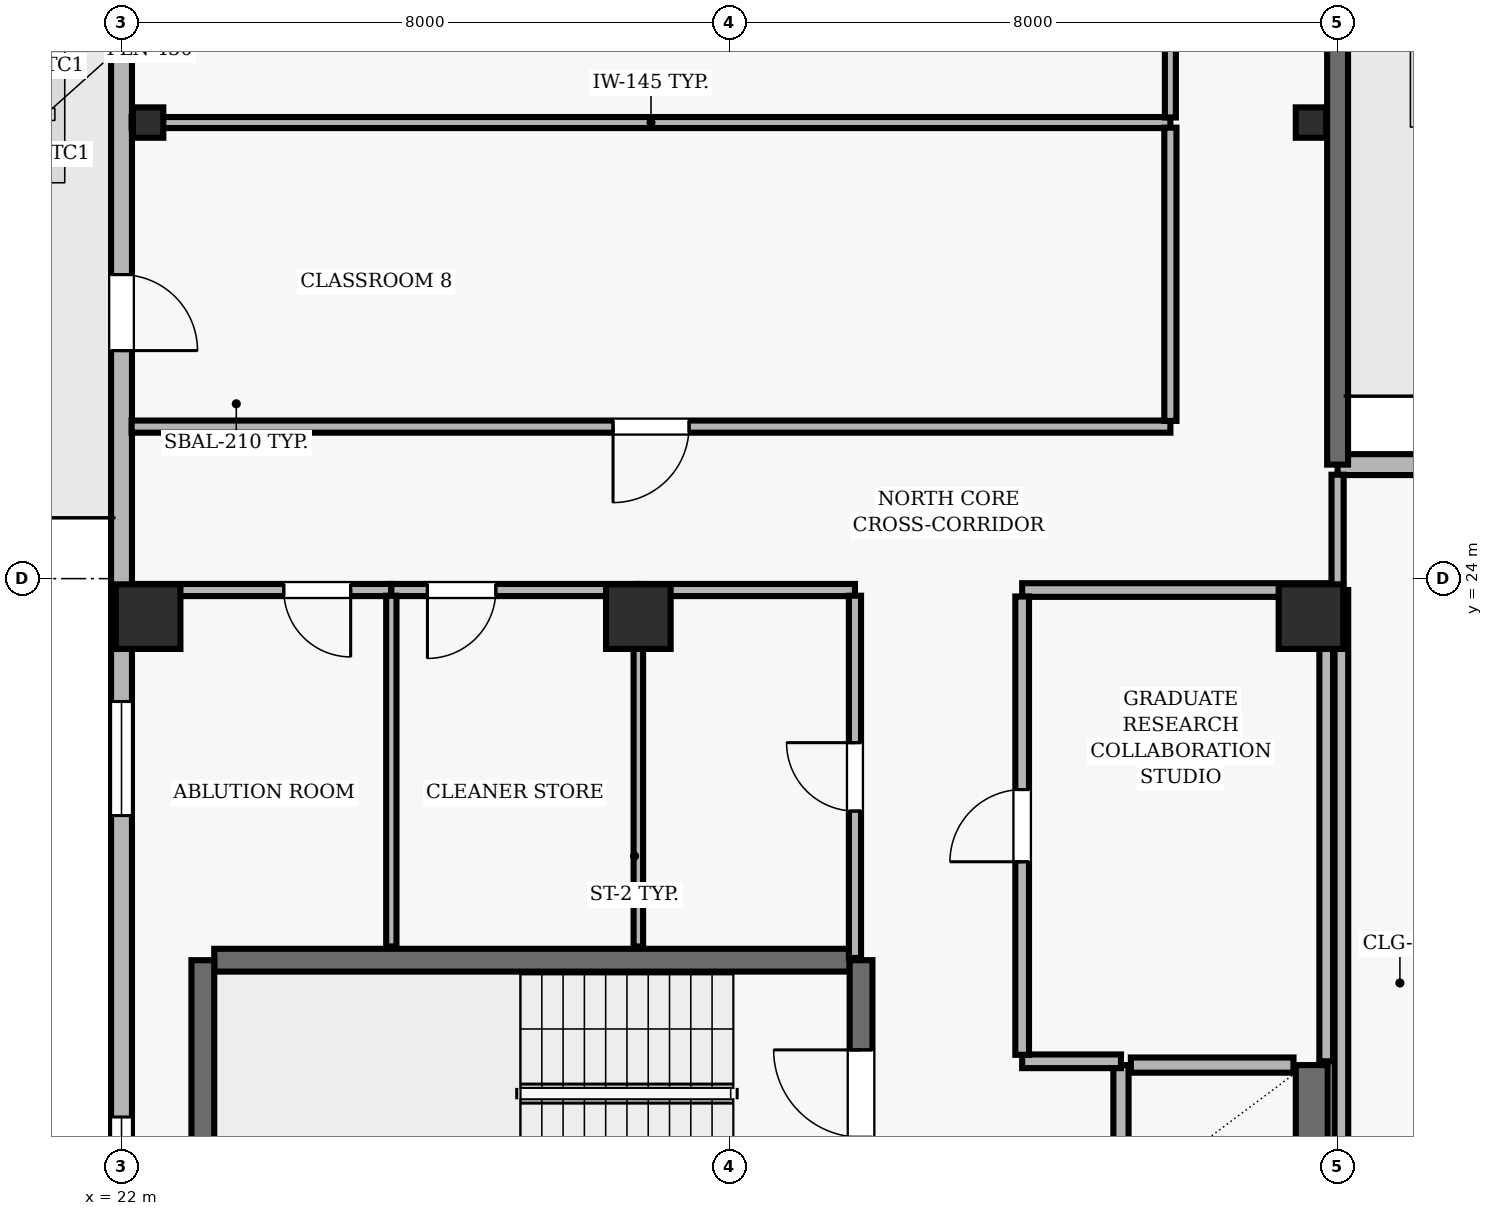
"""IFC4 building model, lengths in metres.
Left out: names, types, materials, properties, quantities, classifications, styles, units other than length and angle.
Written with IfcOpenShell. Run it as: python <this file> out.ifc"""

import sys

from ifc_helpers import new_model, si_unit, direction, frame, frame_2d, origin, origin_2d, place, context, subcontext, project, spatial, rectangle, hollow_rectangle, extrude, element, fill, save


model = new_model("IFC4")
c1 = context("Model", 3, precision=1e-05, world=origin(), true_north=direction((0.0, 1.0)))
c2 = subcontext(c1, "Body", "Model", "MODEL_VIEW")
j1 = project(units=[si_unit("LENGTHUNIT", "METRE"), si_unit("PLANEANGLEUNIT", "RADIAN")], contexts=[c1])
p1 = place(None, origin())
s1 = spatial("IfcSite", under=j1, at=p1, CompositionType="ELEMENT")
p2 = place(p1, origin())
s2 = spatial("IfcBuilding", under=s1, at=p2, CompositionType="ELEMENT")
p3 = place(p2, frame((0.0, 0.0, 252.1)))
s3 = spatial("IfcBuildingStorey", under=s2, at=p3, CompositionType="ELEMENT", Elevation=252.1)
for number, where, z_axis, x_axis in (
    (1, (22.35, 23.5, 0.0), (0.0, 0.0, 1.0), (1.0, 0.0, 0.0)),
    (2, (28.8, 23.5, 0.0), (0.0, 0.0, 1.0), (1.0, 0.0, 0.0)),
    (3, (37.65, 23.5, 0.0), (0.0, 0.0, 1.0), (1.0, 0.0, 0.0)),
):
    element("IfcColumn", number, at=place(p3, frame(where, z_axis=z_axis, x_axis=x_axis)), inside=s3, PredefinedType="COLUMN", context=c2, shape_type="SweptSolid", body=[
        extrude(rectangle(XDim=0.85, YDim=0.85, at=origin_2d()), origin(), (0.0, 0.0, 1.0), 3.9),
    ])
for number, where, z_axis, x_axis in (
    (4, (22.35, 30.0, 0.0), (0.0, 0.0, 1.0), (1.0, 0.0, 0.0)),
    (5, (37.65, 30.0, 0.0), (0.0, 0.0, 1.0), (1.0, 0.0, 0.0)),
):
    element("IfcColumn", number, at=place(p3, frame(where, z_axis=z_axis, x_axis=x_axis)), inside=s3, PredefinedType="COLUMN", context=c2, shape_type="SweptSolid", body=[
        extrude(hollow_rectangle(XDim=0.4, YDim=0.4, WallThickness=0.02, at=origin_2d()), origin(), (0.0, 0.0, 1.0), 3.9),
    ])
p4 = place(p3, frame((43.64, 25.5, 0.0), z_axis=(0.0, 0.0, 1.0), x_axis=(-1.0, 0.0, 0.0)))
e6 = element("IfcWall", 6, at=p4, inside=s3, PredefinedType="SOLIDWALL", context=c2, shape_type="SweptSolid", body=[
    extrude(rectangle(XDim=5.64, YDim=0.275, at=frame_2d((2.82, 0.0))), origin(), (0.0, 0.0, 1.0), 3.69),
])
p5 = place(p4, frame((1.42, 0.0, 0.9)))
e7 = element("IfcOpeningElement", 7, at=p5, cuts=e6, PredefinedType="OPENING", context=c2, shape_type="SweptSolid", body=[
    extrude(rectangle(XDim=2.8, YDim=1.8, at=frame_2d((1.4, 0.9))), frame((0.0, 0.147, 0.0), z_axis=(0.0, -1.0, 0.0), x_axis=(1.0, 0.0, 0.0)), (0.0, 0.0, 1.0), 0.295),
])
p6 = place(p3, frame((38.0, 25.5, 0.0), z_axis=(0.0, 0.0, 1.0), x_axis=(0.0, 1.0, 0.0)))
e8 = element("IfcWall", 8, at=p6, inside=s3, PredefinedType="SOLIDWALL", context=c2, shape_type="SweptSolid", body=[
    extrude(rectangle(XDim=9.8, YDim=0.275, at=frame_2d((4.9, 0.0))), origin(), (0.0, 0.0, 1.0), 3.69),
])
p7 = place(p6, frame((6.7, 0.0, 0.0)))
e9 = element("IfcOpeningElement", 9, at=p7, cuts=e8, PredefinedType="OPENING", context=c2, shape_type="SweptSolid", body=[
    extrude(rectangle(XDim=1.0, YDim=2.2, at=frame_2d((0.5, 1.1))), frame((0.0, 0.147, 0.0), z_axis=(0.0, -1.0, 0.0), x_axis=(1.0, 0.0, 0.0)), (0.0, 0.0, 1.0), 0.295),
])
p8 = place(p3, frame((22.0, 35.3, 0.0), z_axis=(0.0, 0.0, 1.0), x_axis=(0.0, -1.0, 0.0)))
e10 = element("IfcWall", 10, at=p8, inside=s3, PredefinedType="SOLIDWALL", context=c2, shape_type="SweptSolid", body=[
    extrude(rectangle(XDim=32.8, YDim=0.275, at=frame_2d((16.4, 0.0))), origin(), (0.0, 0.0, 1.0), 3.69),
])
p9 = place(p8, frame((7.3, 0.0, 0.0)))
e11 = element("IfcOpeningElement", 11, at=p9, cuts=e10, PredefinedType="OPENING", context=c2, shape_type="SweptSolid", body=[
    extrude(rectangle(XDim=1.0, YDim=2.2, at=frame_2d((0.5, 1.1))), frame((0.0, 0.147, 0.0), z_axis=(0.0, -1.0, 0.0), x_axis=(1.0, 0.0, 0.0)), (0.0, 0.0, 1.0), 0.295),
])
p10 = place(p8, frame((1.983, 0.0, 0.9)))
e12 = element("IfcOpeningElement", 12, at=p10, cuts=e10, PredefinedType="OPENING", context=c2, shape_type="SweptSolid", body=[
    extrude(rectangle(XDim=1.5, YDim=1.6, at=frame_2d((0.75, 0.8))), frame((0.0, 0.147, 0.0), z_axis=(0.0, -1.0, 0.0), x_axis=(1.0, 0.0, 0.0)), (0.0, 0.0, 1.0), 0.295),
])
p11 = place(p8, frame((12.917, 0.0, 0.9)))
e13 = element("IfcOpeningElement", 13, at=p11, cuts=e10, PredefinedType="OPENING", context=c2, shape_type="SweptSolid", body=[
    extrude(rectangle(XDim=1.5, YDim=1.6, at=frame_2d((0.75, 0.8))), frame((0.0, 0.147, 0.0), z_axis=(0.0, -1.0, 0.0), x_axis=(1.0, 0.0, 0.0)), (0.0, 0.0, 1.0), 0.295),
])
p12 = place(p8, frame((18.383, 0.0, 0.9)))
e14 = element("IfcOpeningElement", 14, at=p12, cuts=e10, PredefinedType="OPENING", context=c2, shape_type="SweptSolid", body=[
    extrude(rectangle(XDim=1.5, YDim=1.6, at=frame_2d((0.75, 0.8))), frame((0.0, 0.147, 0.0), z_axis=(0.0, -1.0, 0.0), x_axis=(1.0, 0.0, 0.0)), (0.0, 0.0, 1.0), 0.295),
])
p13 = place(p8, frame((23.85, 0.0, 0.9)))
e15 = element("IfcOpeningElement", 15, at=p13, cuts=e10, PredefinedType="OPENING", context=c2, shape_type="SweptSolid", body=[
    extrude(rectangle(XDim=1.5, YDim=1.6, at=frame_2d((0.75, 0.8))), frame((0.0, 0.147, 0.0), z_axis=(0.0, -1.0, 0.0), x_axis=(1.0, 0.0, 0.0)), (0.0, 0.0, 1.0), 0.295),
])
p14 = place(p3, frame((31.58, 18.98, 0.0), z_axis=(0.0, 0.0, 1.0), x_axis=(-1.0, 0.0, 0.0)))
e16 = element("IfcWall", 16, at=p14, inside=s3, PredefinedType="SHEAR", context=c2, shape_type="SweptSolid", body=[
    extrude(rectangle(XDim=8.36, YDim=0.3, at=frame_2d((4.18, 0.0))), origin(), (0.0, 0.0, 1.0), 3.69),
])
p15 = place(p3, frame((23.07, 18.98, 0.0), z_axis=(0.0, 0.0, 1.0), x_axis=(0.0, -1.0, 0.0)))
e17 = element("IfcWall", 17, at=p15, inside=s3, PredefinedType="SHEAR", context=c2, shape_type="SweptSolid", body=[
    extrude(rectangle(XDim=3.51, YDim=0.3, at=frame_2d((1.755, 0.0))), origin(), (0.0, 0.0, 1.0), 3.69),
])
p16 = place(p3, frame((31.73, 15.47, 0.0), z_axis=(0.0, 0.0, 1.0), x_axis=(0.0, 1.0, 0.0)))
e18 = element("IfcWall", 18, at=p16, inside=s3, PredefinedType="SHEAR", context=c2, shape_type="SweptSolid", body=[
    extrude(rectangle(XDim=3.51, YDim=0.3, at=frame_2d((1.755, 0.0))), origin(), (0.0, 0.0, 1.0), 3.69),
])
p17 = place(p16, frame((1.18, 0.0, 0.0)))
e19 = element("IfcOpeningElement", 19, at=p17, cuts=e18, PredefinedType="OPENING", context=c2, shape_type="SweptSolid", body=[
    extrude(rectangle(XDim=1.15, YDim=2.15, at=frame_2d((0.575, 1.075))), frame((0.0, 0.16, 0.0), z_axis=(0.0, -1.0, 0.0), x_axis=(1.0, 0.0, 0.0)), (0.0, 0.0, 1.0), 0.32),
])
p18 = place(p3, frame((35.15, 17.6, 0.0), z_axis=(0.0, 0.0, 1.0), x_axis=(0.0, -1.0, 0.0)))
e20 = element("IfcWall", 20, at=p18, inside=s3, PredefinedType="SOLIDWALL", context=c2, shape_type="SweptSolid", body=[
    extrude(rectangle(XDim=1.85, YDim=0.2, at=frame_2d((0.925, 0.0))), origin(), (0.0, 0.0, 1.0), 3.69),
])
p19 = place(p3, frame((37.66, 15.75, 0.0), z_axis=(0.0, 0.0, 1.0), x_axis=(0.0, 1.0, 0.0)))
e21 = element("IfcWall", 21, at=p19, inside=s3, PredefinedType="SHEAR", context=c2, shape_type="SweptSolid", body=[
    extrude(rectangle(XDim=1.85, YDim=0.42, at=frame_2d((0.925, 0.0))), origin(), (0.0, 0.0, 1.0), 3.69),
])
p20 = place(p3, frame((37.42, 17.6, 0.0), z_axis=(0.0, 0.0, 1.0), x_axis=(-1.0, 0.0, 0.0)))
e22 = element("IfcWall", 22, at=p20, inside=s3, PredefinedType="SOLIDWALL", context=c2, shape_type="SweptSolid", body=[
    extrude(rectangle(XDim=2.14, YDim=0.2, at=frame_2d((1.07, 0.0))), origin(), (0.0, 0.0, 1.0), 3.69),
])
p21 = place(p3, frame((25.55, 23.85, 0.0), z_axis=(0.0, 0.0, 1.0), x_axis=(-1.0, 0.0, 0.0)))
e23 = element("IfcWall", 23, at=p21, inside=s3, PredefinedType="PARTITIONING", context=c2, shape_type="SweptSolid", body=[
    extrude(rectangle(XDim=3.35, YDim=0.16, at=frame_2d((1.675, 0.0))), origin(), (0.0, 0.0, 1.0), 3.227),
])
p22 = place(p21, frame((0.535, 0.0, 0.0)))
e24 = element("IfcOpeningElement", 24, at=p22, cuts=e23, PredefinedType="OPENING", context=c2, shape_type="SweptSolid", body=[
    extrude(rectangle(XDim=0.88, YDim=2.1, at=frame_2d((0.44, 1.05))), frame((0.0, 0.09, 0.0), z_axis=(0.0, -1.0, 0.0), x_axis=(1.0, 0.0, 0.0)), (0.0, 0.0, 1.0), 0.18),
])
p23 = place(p3, frame((28.8, 23.85, 0.0), z_axis=(0.0, 0.0, 1.0), x_axis=(-1.0, 0.0, 0.0)))
e25 = element("IfcWall", 25, at=p23, inside=s3, PredefinedType="PARTITIONING", context=c2, shape_type="SweptSolid", body=[
    extrude(rectangle(XDim=3.25, YDim=0.16, at=frame_2d((1.625, 0.0))), origin(), (0.0, 0.0, 1.0), 3.227),
])
p24 = place(p23, frame((1.875, 0.0, 0.0)))
e26 = element("IfcOpeningElement", 26, at=p24, cuts=e25, PredefinedType="OPENING", context=c2, shape_type="SweptSolid", body=[
    extrude(rectangle(XDim=0.9, YDim=2.1, at=frame_2d((0.45, 1.05))), frame((0.0, 0.09, 0.0), z_axis=(0.0, -1.0, 0.0), x_axis=(1.0, 0.0, 0.0)), (0.0, 0.0, 1.0), 0.18),
])
p25 = place(p3, frame((31.65, 23.85, 0.0), z_axis=(0.0, 0.0, 1.0), x_axis=(-1.0, 0.0, 0.0)))
e27 = element("IfcWall", 27, at=p25, inside=s3, PredefinedType="PARTITIONING", context=c2, shape_type="SweptSolid", body=[
    extrude(rectangle(XDim=2.85, YDim=0.16, at=frame_2d((1.425, 0.0))), origin(), (0.0, 0.0, 1.0), 3.227),
])
p26 = place(p3, frame((33.85, 17.65, 0.0), z_axis=(0.0, 0.0, 1.0), x_axis=(1.0, 0.0, 0.0)))
e28 = element("IfcWall", 28, at=p26, inside=s3, PredefinedType="PARTITIONING", context=c2, shape_type="SweptSolid", body=[
    extrude(rectangle(XDim=1.3, YDim=0.18, at=frame_2d((0.65, 0.0))), origin(), (0.0, 0.0, 1.0), 3.69),
])
p27 = place(p3, frame((35.8, 26.0, 0.0), z_axis=(0.0, 0.0, 1.0), x_axis=(-1.0, 0.0, 0.0)))
e29 = element("IfcWall", 29, at=p27, inside=s3, PredefinedType="PARTITIONING", context=c2, shape_type="SweptSolid", body=[
    extrude(rectangle(XDim=13.667, YDim=0.16, at=frame_2d((6.833, 0.0))), origin(), (0.0, 0.0, 1.0), 3.69),
])
p28 = place(p27, frame((6.333, 0.0, 0.0)))
e30 = element("IfcOpeningElement", 30, at=p28, cuts=e29, PredefinedType="OPENING", context=c2, shape_type="SweptSolid", body=[
    extrude(rectangle(XDim=1.0, YDim=2.1, at=frame_2d((0.5, 1.05))), frame((0.0, 0.09, 0.0), z_axis=(0.0, -1.0, 0.0), x_axis=(1.0, 0.0, 0.0)), (0.0, 0.0, 1.0), 0.18),
])
p29 = place(p3, frame((35.8, 30.0, 0.0), z_axis=(0.0, 0.0, 1.0), x_axis=(-1.0, 0.0, 0.0)))
e31 = element("IfcWall", 31, at=p29, inside=s3, PredefinedType="PARTITIONING", context=c2, shape_type="SweptSolid", body=[
    extrude(rectangle(XDim=13.667, YDim=0.145, at=frame_2d((6.833, 0.0))), origin(), (0.0, 0.0, 1.0), 3.227),
])
p30 = place(p3, frame((37.85, 23.85, 0.0), z_axis=(0.0, 0.0, 1.0), x_axis=(-1.0, 0.0, 0.0)))
e32 = element("IfcWall", 32, at=p30, inside=s3, PredefinedType="PARTITIONING", context=c2, shape_type="SweptSolid", body=[
    extrude(rectangle(XDim=4.0, YDim=0.18, at=frame_2d((2.0, 0.0))), origin(), (0.0, 0.0, 1.0), 3.227),
])
p31 = place(p3, frame((25.55, 19.16, 0.0), z_axis=(0.0, 0.0, 1.0), x_axis=(0.0, 1.0, 0.0)))
e33 = element("IfcWall", 33, at=p31, inside=s3, PredefinedType="PARTITIONING", context=c2, shape_type="SweptSolid", body=[
    extrude(rectangle(XDim=4.615, YDim=0.135, at=frame_2d((2.308, 0.0))), origin(), (0.0, 0.0, 1.0), 3.69),
])
p32 = place(p3, frame((28.8, 23.775, 0.0), z_axis=(0.0, 0.0, 1.0), x_axis=(0.0, -1.0, 0.0)))
e34 = element("IfcWall", 34, at=p32, inside=s3, PredefinedType="PARTITIONING", context=c2, shape_type="SweptSolid", body=[
    extrude(rectangle(XDim=4.615, YDim=0.125, at=frame_2d((2.308, 0.0))), origin(), (0.0, 0.0, 1.0), 3.69),
])
p33 = place(p3, frame((31.65, 19.01, 0.0), z_axis=(0.0, 0.0, 1.0), x_axis=(0.0, 1.0, 0.0)))
e35 = element("IfcWall", 35, at=p33, inside=s3, PredefinedType="PARTITIONING", context=c2, shape_type="SweptSolid", body=[
    extrude(rectangle(XDim=4.765, YDim=0.16, at=frame_2d((2.382, 0.0))), origin(), (0.0, 0.0, 1.0), 3.69),
])
p34 = place(p33, frame((1.932, 0.0, 0.0)))
e36 = element("IfcOpeningElement", 36, at=p34, cuts=e35, PredefinedType="OPENING", context=c2, shape_type="SweptSolid", body=[
    extrude(rectangle(XDim=0.9, YDim=2.1, at=frame_2d((0.45, 1.05))), frame((0.0, 0.09, 0.0), z_axis=(0.0, -1.0, 0.0), x_axis=(1.0, 0.0, 0.0)), (0.0, 0.0, 1.0), 0.18),
])
p35 = place(p3, frame((33.85, 17.735, 0.0), z_axis=(0.0, 0.0, 1.0), x_axis=(0.0, 1.0, 0.0)))
e37 = element("IfcWall", 37, at=p35, inside=s3, PredefinedType="PARTITIONING", context=c2, shape_type="SweptSolid", body=[
    extrude(rectangle(XDim=6.03, YDim=0.18, at=frame_2d((3.015, 0.0))), origin(), (0.0, 0.0, 1.0), 3.69),
])
p36 = place(p35, frame((2.54, 0.0, 0.0)))
e38 = element("IfcOpeningElement", 38, at=p36, cuts=e37, PredefinedType="OPENING", context=c2, shape_type="SweptSolid", body=[
    extrude(rectangle(XDim=0.95, YDim=2.1, at=frame_2d((0.475, 1.05))), frame((0.0, 0.1, 0.0), z_axis=(0.0, -1.0, 0.0), x_axis=(1.0, 0.0, 0.0)), (0.0, 0.0, 1.0), 0.2),
])
p37 = place(p3, frame((35.8, 29.933, 0.0), z_axis=(0.0, 0.0, 1.0), x_axis=(0.0, -1.0, 0.0)))
e39 = element("IfcWall", 39, at=p37, inside=s3, PredefinedType="PARTITIONING", context=c2, shape_type="SweptSolid", body=[
    extrude(rectangle(XDim=3.858, YDim=0.16, at=frame_2d((1.929, 0.0))), origin(), (0.0, 0.0, 1.0), 3.69),
])
p38 = place(p3, frame((35.8, 33.935, 0.0), z_axis=(0.0, 0.0, 1.0), x_axis=(0.0, -1.0, 0.0)))
e40 = element("IfcWall", 40, at=p38, inside=s3, PredefinedType="PARTITIONING", context=c2, shape_type="SweptSolid", body=[
    extrude(rectangle(XDim=3.868, YDim=0.145, at=frame_2d((1.934, 0.0))), origin(), (0.0, 0.0, 1.0), 3.69),
])
p39 = place(p38, frame((1.384, 0.0, 0.0)))
e41 = element("IfcOpeningElement", 41, at=p39, cuts=e40, PredefinedType="OPENING", context=c2, shape_type="SweptSolid", body=[
    extrude(rectangle(XDim=1.1, YDim=2.15, at=frame_2d((0.55, 1.075))), frame((0.0, 0.083, 0.0), z_axis=(0.0, -1.0, 0.0), x_axis=(1.0, 0.0, 0.0)), (0.0, 0.0, 1.0), 0.165),
])
p40 = place(p3, frame((37.85, 17.65, 0.0), z_axis=(0.0, 0.0, 1.0), x_axis=(0.0, 1.0, 0.0)))
e42 = element("IfcWall", 42, at=p40, inside=s3, PredefinedType="PARTITIONING", context=c2, shape_type="SweptSolid", body=[
    extrude(rectangle(XDim=6.115, YDim=0.18, at=frame_2d((3.058, 0.0))), origin(), (0.0, 0.0, 1.0), 3.227),
])
p41 = place(p3, frame((38.0, 23.85, 0.0), z_axis=(0.0, 0.0, 1.0), x_axis=(0.0, 1.0, 0.0)))
e43 = element("IfcWall", 43, at=p41, inside=s3, PredefinedType="PARTITIONING", context=c2, shape_type="SweptSolid", body=[
    extrude(rectangle(XDim=1.517, YDim=0.16, at=frame_2d((0.758, 0.0))), origin(), (0.0, 0.0, 1.0), 3.227),
])
p42 = place(p3, frame((38.05, 23.85, 0.0), z_axis=(0.0, 0.0, 1.0), x_axis=(0.0, -1.0, 0.0)))
e44 = element("IfcWall", 44, at=p42, inside=s3, PredefinedType="PARTITIONING", context=c2, shape_type="SweptSolid", body=[
    extrude(rectangle(XDim=7.775, YDim=0.18, at=frame_2d((3.888, 0.0))), origin(), (0.0, 0.0, 1.0), 3.227),
])
p43 = place(p9, origin())
e45 = element("IfcDoor", 45, at=p43, inside=s3, OperationType="SINGLE_SWING_RIGHT", PredefinedType="DOOR", context=c2, shape_type="SweptSolid", body=[
    extrude(rectangle(XDim=1.0, YDim=2.2, at=frame_2d((0.5, 1.1))), frame((0.0, 0.025, 0.0), z_axis=(0.0, -1.0, 0.0), x_axis=(1.0, 0.0, 0.0)), (0.0, 0.0, 1.0), 0.05),
])
fill(e11, e45)
p44 = place(p11, origin())
e46 = element("IfcWindow", 46, at=p44, inside=s3, PartitioningType="SINGLE_PANEL", PredefinedType="WINDOW", context=c2, shape_type="SweptSolid", body=[
    extrude(rectangle(XDim=1.5, YDim=1.6, at=frame_2d((0.75, 0.8))), frame((0.0, 0.03, 0.0), z_axis=(0.0, -1.0, 0.0), x_axis=(1.0, 0.0, 0.0)), (0.0, 0.0, 1.0), 0.06),
])
fill(e13, e46)
p45 = place(p12, origin())
e47 = element("IfcWindow", 47, at=p45, inside=s3, PartitioningType="SINGLE_PANEL", PredefinedType="WINDOW", context=c2, shape_type="SweptSolid", body=[
    extrude(rectangle(XDim=1.5, YDim=1.6, at=frame_2d((0.75, 0.8))), frame((0.0, 0.03, 0.0), z_axis=(0.0, -1.0, 0.0), x_axis=(1.0, 0.0, 0.0)), (0.0, 0.0, 1.0), 0.06),
])
fill(e14, e47)
p46 = place(p17, origin())
e48 = element("IfcDoor", 48, at=p46, inside=s3, OperationType="SINGLE_SWING_RIGHT", PredefinedType="DOOR", context=c2, shape_type="SweptSolid", body=[
    extrude(rectangle(XDim=1.15, YDim=2.15, at=frame_2d((0.575, 1.075))), frame((0.0, 0.025, 0.0), z_axis=(0.0, -1.0, 0.0), x_axis=(1.0, 0.0, 0.0)), (0.0, 0.0, 1.0), 0.05),
])
fill(e19, e48)
p47 = place(p36, origin())
e49 = element("IfcDoor", 49, at=p47, inside=s3, OperationType="SINGLE_SWING_LEFT", PredefinedType="DOOR", context=c2, shape_type="SweptSolid", body=[
    extrude(rectangle(XDim=0.95, YDim=2.1, at=frame_2d((0.475, 1.05))), frame((0.0, 0.025, 0.0), z_axis=(0.0, -1.0, 0.0), x_axis=(1.0, 0.0, 0.0)), (0.0, 0.0, 1.0), 0.05),
])
fill(e38, e49)
p48 = place(p34, origin())
e50 = element("IfcDoor", 50, at=p48, inside=s3, OperationType="SINGLE_SWING_RIGHT", PredefinedType="DOOR", context=c2, shape_type="SweptSolid", body=[
    extrude(rectangle(XDim=0.9, YDim=2.1, at=frame_2d((0.45, 1.05))), frame((0.0, 0.025, 0.0), z_axis=(0.0, -1.0, 0.0), x_axis=(1.0, 0.0, 0.0)), (0.0, 0.0, 1.0), 0.05),
])
fill(e36, e50)
p49 = place(p22, origin())
e51 = element("IfcDoor", 51, at=p49, inside=s3, OperationType="SINGLE_SWING_LEFT", PredefinedType="DOOR", context=c2, shape_type="SweptSolid", body=[
    extrude(rectangle(XDim=0.88, YDim=2.1, at=frame_2d((0.44, 1.05))), frame((0.0, 0.025, 0.0), z_axis=(0.0, -1.0, 0.0), x_axis=(1.0, 0.0, 0.0)), (0.0, 0.0, 1.0), 0.05),
])
fill(e24, e51)
p50 = place(p24, origin())
e52 = element("IfcDoor", 52, at=p50, inside=s3, OperationType="SINGLE_SWING_RIGHT", PredefinedType="DOOR", context=c2, shape_type="SweptSolid", body=[
    extrude(rectangle(XDim=0.9, YDim=2.1, at=frame_2d((0.45, 1.05))), frame((0.0, 0.025, 0.0), z_axis=(0.0, -1.0, 0.0), x_axis=(1.0, 0.0, 0.0)), (0.0, 0.0, 1.0), 0.05),
])
fill(e26, e52)
p51 = place(p28, origin())
e53 = element("IfcDoor", 53, at=p51, inside=s3, OperationType="SINGLE_SWING_RIGHT", PredefinedType="DOOR", context=c2, shape_type="SweptSolid", body=[
    extrude(rectangle(XDim=1.0, YDim=2.1, at=frame_2d((0.5, 1.05))), frame((0.0, 0.025, 0.0), z_axis=(0.0, -1.0, 0.0), x_axis=(1.0, 0.0, 0.0)), (0.0, 0.0, 1.0), 0.05),
])
fill(e30, e53)
save(model, sys.argv[1])
